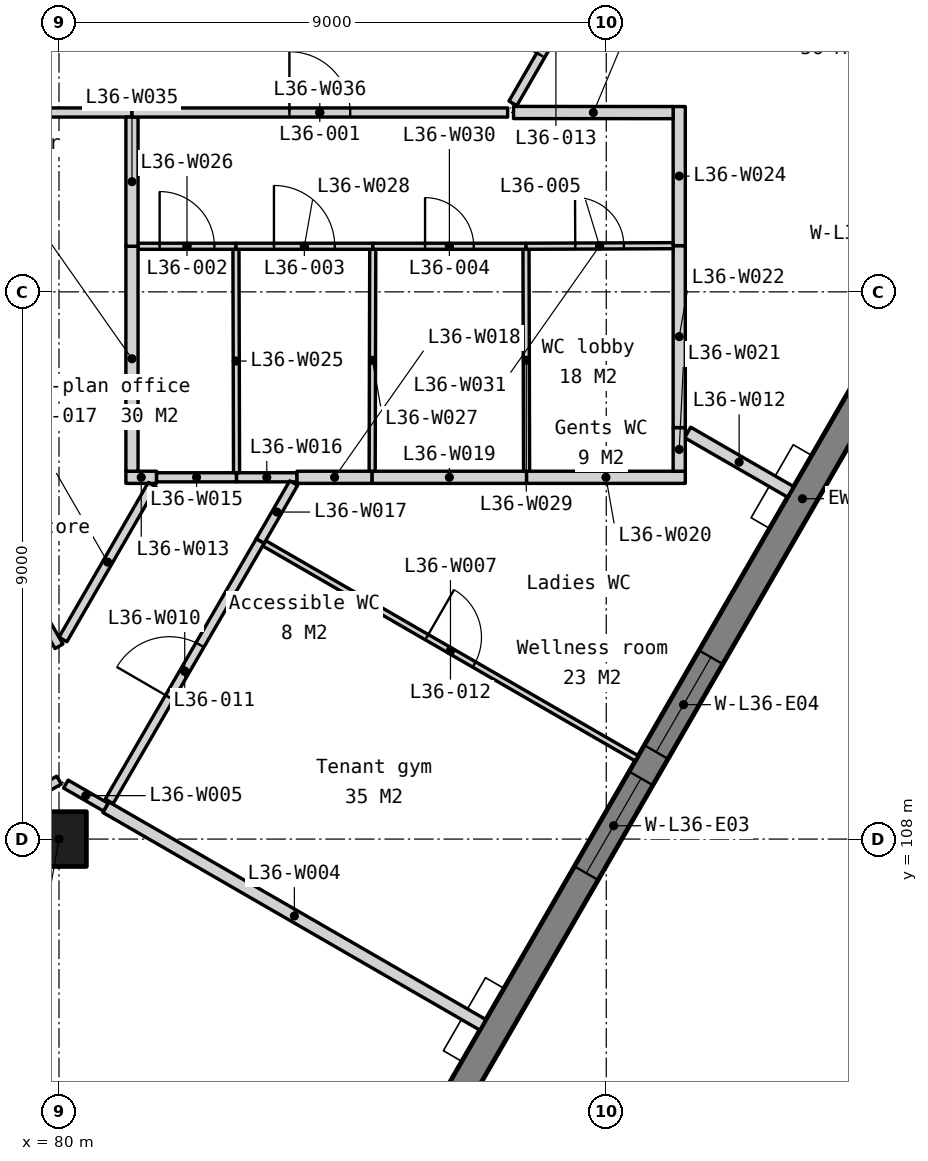
"""IFC4 building model, lengths in metres.
Left out: names, types, materials, properties, quantities, classifications, styles, units other than length and angle.
Written with IfcOpenShell. Run it as: python <this file> out.ifc"""

import sys

from ifc_helpers import new_model, si_unit, direction, frame, frame_2d, origin, origin_2d, place, context, subcontext, project, spatial, polyline, rectangle, outline, extrude, element, fill, save


model = new_model("IFC4")
c1 = context("Model", 3, precision=1e-05, world=origin(), true_north=direction((0.0, 1.0)))
c2 = subcontext(c1, "Body", "Model", "MODEL_VIEW")
j1 = project(units=[si_unit("LENGTHUNIT", "METRE"), si_unit("PLANEANGLEUNIT", "RADIAN")], contexts=[c1])
p1 = place(None, origin())
s1 = spatial("IfcSite", under=j1, at=p1, CompositionType="ELEMENT")
p2 = place(p1, origin())
s2 = spatial("IfcBuilding", under=s1, at=p2, CompositionType="ELEMENT")
p3 = place(p2, frame((0.0, 0.0, 144.2)))
s3 = spatial("IfcBuildingStorey", under=s2, at=p3, CompositionType="ELEMENT", Elevation=144.2)
p4 = place(p3, frame((80.0, 108.0, 0.0), z_axis=(0.0, 0.0, 1.0), x_axis=(1.0, 0.0, 0.0)))
e1 = element("IfcColumn", 1, at=p4, inside=s3, PredefinedType="COLUMN", context=c2, shape_type="SweptSolid", body=[
    extrude(rectangle(XDim=0.9, YDim=0.9, at=origin_2d()), origin(), (0.0, 0.0, 1.0), 3.9),
])
p5 = place(p3, frame((82.105, 96.067, -0.15), z_axis=(0.0, 0.0, 1.0), x_axis=(0.499997369791, 0.866026922331, 0.0)))
e2 = element("IfcWall", 2, at=p5, inside=s3, PredefinedType="SOLIDWALL", context=c2, shape_type="SweptSolid", body=[
    extrude(outline(polyline([(40.486, 0.0), (40.486, 3.9), (0.0, 3.9), (0.0, 0.0), (40.486, 0.0)])), frame((0.0, 0.225, 0.0), z_axis=(0.0, -1.0, 0.0), x_axis=(1.0, 0.0, 0.0)), (0.0, 0.0, 1.0), 0.45),
])
p6 = place(p5, frame((3.011, 0.0, 0.95)))
e3 = element("IfcOpeningElement", 3, at=p6, cuts=e2, PredefinedType="OPENING", context=c2, shape_type="SweptSolid", body=[
    extrude(rectangle(XDim=1.8, YDim=2.2, at=frame_2d((0.9, 1.1))), frame((0.0, 0.235, 0.0), z_axis=(0.0, -1.0, 0.0), x_axis=(1.0, 0.0, 0.0)), (0.0, 0.0, 1.0), 0.47),
])
p7 = place(p5, frame((5.311, 0.0, 0.95)))
e4 = element("IfcOpeningElement", 4, at=p7, cuts=e2, PredefinedType="OPENING", context=c2, shape_type="SweptSolid", body=[
    extrude(rectangle(XDim=1.8, YDim=2.2, at=frame_2d((0.9, 1.1))), frame((0.0, 0.235, 0.0), z_axis=(0.0, -1.0, 0.0), x_axis=(1.0, 0.0, 0.0)), (0.0, 0.0, 1.0), 0.47),
])
p8 = place(p5, frame((13.132, 0.0, 0.95)))
e5 = element("IfcOpeningElement", 5, at=p8, cuts=e2, PredefinedType="OPENING", context=c2, shape_type="SweptSolid", body=[
    extrude(rectangle(XDim=1.8, YDim=2.2, at=frame_2d((0.9, 1.1))), frame((0.0, 0.235, 0.0), z_axis=(0.0, -1.0, 0.0), x_axis=(1.0, 0.0, 0.0)), (0.0, 0.0, 1.0), 0.47),
])
p9 = place(p5, frame((15.432, 0.0, 0.95)))
e6 = element("IfcOpeningElement", 6, at=p9, cuts=e2, PredefinedType="OPENING", context=c2, shape_type="SweptSolid", body=[
    extrude(rectangle(XDim=1.8, YDim=2.2, at=frame_2d((0.9, 1.1))), frame((0.0, 0.235, 0.0), z_axis=(0.0, -1.0, 0.0), x_axis=(1.0, 0.0, 0.0)), (0.0, 0.0, 1.0), 0.47),
])
p10 = place(p5, frame((23.254, 0.0, 0.95)))
e7 = element("IfcOpeningElement", 7, at=p10, cuts=e2, PredefinedType="OPENING", context=c2, shape_type="SweptSolid", body=[
    extrude(rectangle(XDim=1.8, YDim=2.2, at=frame_2d((0.9, 1.1))), frame((0.0, 0.235, 0.0), z_axis=(0.0, -1.0, 0.0), x_axis=(1.0, 0.0, 0.0)), (0.0, 0.0, 1.0), 0.47),
])
p11 = place(p5, frame((25.554, 0.0, 0.95)))
e8 = element("IfcOpeningElement", 8, at=p11, cuts=e2, PredefinedType="OPENING", context=c2, shape_type="SweptSolid", body=[
    extrude(rectangle(XDim=1.8, YDim=2.2, at=frame_2d((0.9, 1.1))), frame((0.0, 0.235, 0.0), z_axis=(0.0, -1.0, 0.0), x_axis=(1.0, 0.0, 0.0)), (0.0, 0.0, 1.0), 0.47),
])
p12 = place(p5, frame((33.375, 0.0, 0.95)))
e9 = element("IfcOpeningElement", 9, at=p12, cuts=e2, PredefinedType="OPENING", context=c2, shape_type="SweptSolid", body=[
    extrude(rectangle(XDim=1.8, YDim=2.2, at=frame_2d((0.9, 1.1))), frame((0.0, 0.235, 0.0), z_axis=(0.0, -1.0, 0.0), x_axis=(1.0, 0.0, 0.0)), (0.0, 0.0, 1.0), 0.47),
])
p13 = place(p5, frame((35.675, 0.0, 0.95)))
e10 = element("IfcOpeningElement", 10, at=p13, cuts=e2, PredefinedType="OPENING", context=c2, shape_type="SweptSolid", body=[
    extrude(rectangle(XDim=1.8, YDim=2.2, at=frame_2d((0.9, 1.1))), frame((0.0, 0.235, 0.0), z_axis=(0.0, -1.0, 0.0), x_axis=(1.0, 0.0, 0.0)), (0.0, 0.0, 1.0), 0.47),
])
p14 = place(p3, frame((79.23, 108.525, 0.0), z_axis=(0.0, 0.0, 1.0), x_axis=(0.865970738743, 0.500094670678, 0.0)))
e11 = element("IfcWall", 11, at=p14, inside=s3, PredefinedType="PARTITIONING", context=c2, shape_type="SweptSolid", body=[
    extrude(rectangle(XDim=0.889, YDim=0.15, at=frame_2d((0.445, 0.0))), origin(), (0.0, 0.0, 1.0), 3.75),
])
p15 = place(p3, frame((80.77, 108.525, 0.0), z_axis=(0.0, 0.0, 1.0), x_axis=(0.866033408367, -0.4999861354, 0.0)))
e12 = element("IfcWall", 12, at=p15, inside=s3, PredefinedType="PARTITIONING", context=c2, shape_type="SweptSolid", body=[
    extrude(rectangle(XDim=7.16, YDim=0.2, at=frame_2d((3.58, 0.0))), origin(), (0.0, 0.0, 1.0), 3.75),
])
p16 = place(p3, frame((80.113, 108.905, 0.0), z_axis=(0.0, 0.0, 1.0), x_axis=(0.865939322839, -0.50014906694, 0.0)))
e13 = element("IfcWall", 13, at=p16, inside=s3, PredefinedType="PARTITIONING", context=c2, shape_type="SweptSolid", body=[
    extrude(rectangle(XDim=0.76, YDim=0.15, at=frame_2d((0.38, 0.0))), origin(), (0.0, 0.0, 1.0), 3.75),
])
p17 = place(p3, frame((83.374, 112.865, 0.0), z_axis=(0.0, 0.0, 1.0), x_axis=(0.866021813296, -0.500006218857, 0.0)))
e14 = element("IfcWall", 14, at=p17, inside=s3, PredefinedType="PARTITIONING", context=c2, shape_type="SweptSolid", body=[
    extrude(rectangle(XDim=7.075, YDim=0.1, at=frame_2d((3.538, 0.0))), origin(), (0.0, 0.0, 1.0), 3.75),
])
p18 = place(p17, frame((3.087, 0.0, 0.0)))
e15 = element("IfcOpeningElement", 15, at=p18, cuts=e14, PredefinedType="OPENING", context=c2, shape_type="SweptSolid", body=[
    extrude(rectangle(XDim=0.9, YDim=2.1, at=frame_2d((0.45, 1.05))), frame((0.0, 0.06, 0.0), z_axis=(0.0, -1.0, 0.0), x_axis=(1.0, 0.0, 0.0)), (0.0, 0.0, 1.0), 0.12),
])
p19 = place(p3, frame((74.931, 119.95, 0.0), z_axis=(0.0, 0.0, 1.0), x_axis=(0.499998319705, -0.866026373901, 0.0)))
e16 = element("IfcWall", 16, at=p19, inside=s3, PredefinedType="PARTITIONING", context=c2, shape_type="SweptSolid", body=[
    extrude(rectangle(XDim=10.138, YDim=0.15, at=frame_2d((5.069, 0.0))), origin(), (0.0, 0.0, 1.0), 3.75),
])
p20 = place(p19, frame((4.169, 0.0, 0.0)))
e17 = element("IfcOpeningElement", 17, at=p20, cuts=e16, PredefinedType="OPENING", context=c2, shape_type="SweptSolid", body=[
    extrude(rectangle(XDim=1.8, YDim=2.1, at=frame_2d((0.9, 1.05))), frame((0.0, 0.085, 0.0), z_axis=(0.0, -1.0, 0.0), x_axis=(1.0, 0.0, 0.0)), (0.0, 0.0, 1.0), 0.17),
])
p21 = place(p3, frame((80.825, 108.62, 0.0), z_axis=(0.0, 0.0, 1.0), x_axis=(0.501704805906, 0.865038893768, 0.0)))
e18 = element("IfcWall", 18, at=p21, inside=s3, PredefinedType="PARTITIONING", context=c2, shape_type="SweptSolid", body=[
    extrude(rectangle(XDim=4.951, YDim=0.15, at=frame_2d((2.476, 0.0))), origin(), (0.0, 0.0, 1.0), 3.75),
])
p22 = place(p21, frame((1.975, 0.0, 0.0)))
e19 = element("IfcOpeningElement", 19, at=p22, cuts=e18, PredefinedType="OPENING", context=c2, shape_type="SweptSolid", body=[
    extrude(rectangle(XDim=1.0, YDim=2.1, at=frame_2d((0.5, 1.05))), frame((0.0, 0.085, 0.0), z_axis=(0.0, -1.0, 0.0), x_axis=(1.0, 0.0, 0.0)), (0.0, 0.0, 1.0), 0.17),
])
p23 = place(p3, frame((90.339, 114.688, 0.0), z_axis=(0.0, 0.0, 1.0), x_axis=(0.866021300503, -0.500007107024, 0.0)))
e20 = element("IfcWall", 20, at=p23, inside=s3, PredefinedType="PARTITIONING", context=c2, shape_type="SweptSolid", body=[
    extrude(rectangle(XDim=1.955, YDim=0.2, at=frame_2d((0.978, 0.0))), origin(), (0.0, 0.0, 1.0), 3.75),
])
p24 = place(p3, frame((81.1, 113.95, 0.0), z_axis=(0.0, 0.0, 1.0), x_axis=(1.0, 0.0, 0.0)))
e21 = element("IfcWall", 21, at=p24, inside=s3, PredefinedType="PARTITIONING", context=c2, shape_type="SweptSolid", body=[
    extrude(rectangle(XDim=0.505, YDim=0.2, at=frame_2d((0.252, 0.0))), origin(), (0.0, 0.0, 1.0), 3.75),
])
p25 = place(p3, frame((80.065, 111.283, 0.0), z_axis=(0.0, 0.0, 1.0), x_axis=(0.499962090823, 0.866047289552, 0.0)))
e22 = element("IfcWall", 22, at=p25, inside=s3, PredefinedType="PARTITIONING", context=c2, shape_type="SweptSolid", body=[
    extrude(rectangle(XDim=2.94, YDim=0.15, at=frame_2d((1.47, 0.0))), origin(), (0.0, 0.0, 1.0), 3.75),
])
p26 = place(p3, frame((81.605, 113.95, 0.0), z_axis=(0.0, 0.0, 1.0), x_axis=(1.0, 0.0, 0.0)))
e23 = element("IfcWall", 23, at=p26, inside=s3, PredefinedType="PARTITIONING", context=c2, shape_type="SweptSolid", body=[
    extrude(rectangle(XDim=1.315, YDim=0.15, at=frame_2d((0.658, 0.0))), origin(), (0.0, 0.0, 1.0), 3.75),
])
p27 = place(p3, frame((82.92, 113.95, 0.0), z_axis=(0.0, 0.0, 1.0), x_axis=(1.0, 0.0, 0.0)))
e24 = element("IfcWall", 24, at=p27, inside=s3, PredefinedType="PARTITIONING", context=c2, shape_type="SweptSolid", body=[
    extrude(rectangle(XDim=0.994, YDim=0.15, at=frame_2d((0.497, 0.0))), origin(), (0.0, 0.0, 1.0), 3.75),
])
p28 = place(p3, frame((83.309, 112.903, 0.0), z_axis=(0.0, 0.0, 1.0), x_axis=(0.500055614084, 0.865993292597, 0.0)))
e25 = element("IfcWall", 25, at=p28, inside=s3, PredefinedType="PARTITIONING", context=c2, shape_type="SweptSolid", body=[
    extrude(rectangle(XDim=1.099, YDim=0.15, at=frame_2d((0.55, 0.0))), origin(), (0.0, 0.0, 1.0), 3.75),
])
p29 = place(p3, frame((83.914, 113.95, 0.0), z_axis=(0.0, 0.0, 1.0), x_axis=(1.0, 0.0, 0.0)))
e26 = element("IfcWall", 26, at=p29, inside=s3, PredefinedType="PARTITIONING", context=c2, shape_type="SweptSolid", body=[
    extrude(rectangle(XDim=1.236, YDim=0.2, at=frame_2d((0.618, 0.0))), origin(), (0.0, 0.0, 1.0), 3.75),
])
p30 = place(p3, frame((85.15, 113.95, 0.0), z_axis=(0.0, 0.0, 1.0), x_axis=(1.0, 0.0, 0.0)))
e27 = element("IfcWall", 27, at=p30, inside=s3, PredefinedType="PARTITIONING", context=c2, shape_type="SweptSolid", body=[
    extrude(rectangle(XDim=2.54, YDim=0.2, at=frame_2d((1.27, 0.0))), origin(), (0.0, 0.0, 1.0), 3.75),
])
p31 = place(p3, frame((87.69, 113.95, 0.0), z_axis=(0.0, 0.0, 1.0), x_axis=(1.0, 0.0, 0.0)))
e28 = element("IfcWall", 28, at=p31, inside=s3, PredefinedType="PARTITIONING", context=c2, shape_type="SweptSolid", body=[
    extrude(rectangle(XDim=2.61, YDim=0.2, at=frame_2d((1.305, 0.0))), origin(), (0.0, 0.0, 1.0), 3.75),
])
p32 = place(p3, frame((90.2, 114.05, 0.0), z_axis=(0.0, 0.0, 1.0), x_axis=(0.0, 1.0, 0.0)))
e29 = element("IfcWall", 29, at=p32, inside=s3, PredefinedType="PARTITIONING", context=c2, shape_type="SweptSolid", body=[
    extrude(rectangle(XDim=0.718, YDim=0.2, at=frame_2d((0.359, 0.0))), origin(), (0.0, 0.0, 1.0), 3.75),
])
p33 = place(p3, frame((90.2, 114.768, 0.0), z_axis=(0.0, 0.0, 1.0), x_axis=(0.0, 1.0, 0.0)))
e30 = element("IfcWall", 30, at=p33, inside=s3, PredefinedType="PARTITIONING", context=c2, shape_type="SweptSolid", body=[
    extrude(rectangle(XDim=2.992, YDim=0.2, at=frame_2d((1.496, 0.0))), origin(), (0.0, 0.0, 1.0), 3.75),
])
p34 = place(p3, frame((90.2, 117.76, 0.0), z_axis=(0.0, 0.0, 1.0), x_axis=(0.0, 1.0, 0.0)))
e31 = element("IfcWall", 31, at=p34, inside=s3, PredefinedType="PARTITIONING", context=c2, shape_type="SweptSolid", body=[
    extrude(rectangle(XDim=2.288, YDim=0.2, at=frame_2d((1.144, 0.0))), origin(), (0.0, 0.0, 1.0), 3.75),
])
p35 = place(p3, frame((82.92, 114.025, 0.0), z_axis=(0.0, 0.0, 1.0), x_axis=(-0.002657268237, 0.999996469457, 0.0)))
e32 = element("IfcWall", 32, at=p35, inside=s3, PredefinedType="PARTITIONING", context=c2, shape_type="SweptSolid", body=[
    extrude(rectangle(XDim=3.675, YDim=0.1, at=frame_2d((1.837, 0.0))), origin(), (0.0, 0.0, 1.0), 3.75),
])
p36 = place(p3, frame((81.3, 117.75, 0.0), z_axis=(0.0, 0.0, 1.0), x_axis=(1.0, 0.0, 0.0)))
e33 = element("IfcWall", 33, at=p36, inside=s3, PredefinedType="PARTITIONING", context=c2, shape_type="SweptSolid", body=[
    extrude(rectangle(XDim=1.61, YDim=0.1, at=frame_2d((0.805, 0.0))), origin(), (0.0, 0.0, 1.0), 3.75),
])
p37 = place(p36, frame((0.355, 0.0, 0.0)))
e34 = element("IfcOpeningElement", 34, at=p37, cuts=e33, PredefinedType="OPENING", context=c2, shape_type="SweptSolid", body=[
    extrude(rectangle(XDim=0.9, YDim=2.1, at=frame_2d((0.45, 1.05))), frame((0.0, 0.06, 0.0), z_axis=(0.0, -1.0, 0.0), x_axis=(1.0, 0.0, 0.0)), (0.0, 0.0, 1.0), 0.12),
])
p38 = place(p3, frame((85.15, 114.05, 0.0), z_axis=(0.0, 0.0, 1.0), x_axis=(0.002675575707, 0.999996420641, 0.0)))
e35 = element("IfcWall", 35, at=p38, inside=s3, PredefinedType="PARTITIONING", context=c2, shape_type="SweptSolid", body=[
    extrude(rectangle(XDim=3.65, YDim=0.1, at=frame_2d((1.825, 0.0))), origin(), (0.0, 0.0, 1.0), 3.75),
])
p39 = place(p3, frame((82.91, 117.75, 0.0), z_axis=(0.0, 0.0, 1.0), x_axis=(1.0, 0.0, 0.0)))
e36 = element("IfcWall", 36, at=p39, inside=s3, PredefinedType="PARTITIONING", context=c2, shape_type="SweptSolid", body=[
    extrude(rectangle(XDim=2.25, YDim=0.1, at=frame_2d((1.125, 0.0))), origin(), (0.0, 0.0, 1.0), 3.75),
])
p40 = place(p39, frame((0.625, 0.0, 0.0)))
e37 = element("IfcOpeningElement", 37, at=p40, cuts=e36, PredefinedType="OPENING", context=c2, shape_type="SweptSolid", body=[
    extrude(rectangle(XDim=1.0, YDim=2.1, at=frame_2d((0.5, 1.05))), frame((0.0, 0.06, 0.0), z_axis=(0.0, -1.0, 0.0), x_axis=(1.0, 0.0, 0.0)), (0.0, 0.0, 1.0), 0.12),
])
p41 = place(p3, frame((87.69, 114.05, 0.0), z_axis=(0.0, 0.0, 1.0), x_axis=(-0.002608686776, 0.999996597371, 0.0)))
e38 = element("IfcWall", 38, at=p41, inside=s3, PredefinedType="PARTITIONING", context=c2, shape_type="SweptSolid", body=[
    extrude(rectangle(XDim=3.65, YDim=0.1, at=frame_2d((1.825, 0.0))), origin(), (0.0, 0.0, 1.0), 3.75),
])
p42 = place(p3, frame((85.16, 117.75, 0.0), z_axis=(0.0, 0.0, 1.0), x_axis=(1.0, 0.0, 0.0)))
e39 = element("IfcWall", 39, at=p42, inside=s3, PredefinedType="PARTITIONING", context=c2, shape_type="SweptSolid", body=[
    extrude(rectangle(XDim=2.52, YDim=0.1, at=frame_2d((1.26, 0.0))), origin(), (0.0, 0.0, 1.0), 3.75),
])
p43 = place(p42, frame((0.86, 0.0, 0.0)))
e40 = element("IfcOpeningElement", 40, at=p43, cuts=e39, PredefinedType="OPENING", context=c2, shape_type="SweptSolid", body=[
    extrude(rectangle(XDim=0.8, YDim=2.1, at=frame_2d((0.4, 1.05))), frame((0.0, 0.06, 0.0), z_axis=(0.0, -1.0, 0.0), x_axis=(1.0, 0.0, 0.0)), (0.0, 0.0, 1.0), 0.12),
])
p44 = place(p3, frame((87.68, 117.75, 0.0), z_axis=(0.0, 0.0, 1.0), x_axis=(0.999992261016, 0.003934197335, 0.0)))
e41 = element("IfcWall", 41, at=p44, inside=s3, PredefinedType="PARTITIONING", context=c2, shape_type="SweptSolid", body=[
    extrude(rectangle(XDim=2.42, YDim=0.1, at=frame_2d((1.21, 0.0))), origin(), (0.0, 0.0, 1.0), 3.75),
])
p45 = place(p44, frame((0.81, 0.0, 0.0)))
e42 = element("IfcOpeningElement", 42, at=p45, cuts=e41, PredefinedType="OPENING", context=c2, shape_type="SweptSolid", body=[
    extrude(rectangle(XDim=0.8, YDim=2.1, at=frame_2d((0.4, 1.05))), frame((0.0, 0.06, 0.0), z_axis=(0.0, -1.0, 0.0), x_axis=(1.0, 0.0, 0.0)), (0.0, 0.0, 1.0), 0.12),
])
p46 = place(p3, frame((81.2, 114.05, 0.0), z_axis=(0.0, 0.0, 1.0), x_axis=(0.0, 1.0, 0.0)))
e43 = element("IfcWall", 43, at=p46, inside=s3, PredefinedType="PARTITIONING", context=c2, shape_type="SweptSolid", body=[
    extrude(rectangle(XDim=3.7, YDim=0.2, at=frame_2d((1.85, 0.0))), origin(), (0.0, 0.0, 1.0), 3.75),
])
p47 = place(p3, frame((75.061, 119.95, 0.0), z_axis=(0.0, 0.0, 1.0), x_axis=(1.0, 0.0, 0.0)))
e44 = element("IfcWall", 44, at=p47, inside=s3, PredefinedType="PARTITIONING", context=c2, shape_type="SweptSolid", body=[
    extrude(rectangle(XDim=6.139, YDim=0.15, at=frame_2d((3.069, 0.0))), origin(), (0.0, 0.0, 1.0), 3.75),
])
p48 = place(p3, frame((81.2, 117.75, 0.0), z_axis=(0.0, 0.0, 1.0), x_axis=(0.0, 1.0, 0.0)))
e45 = element("IfcWall", 45, at=p48, inside=s3, PredefinedType="PARTITIONING", context=c2, shape_type="SweptSolid", body=[
    extrude(rectangle(XDim=2.125, YDim=0.2, at=frame_2d((1.062, 0.0))), origin(), (0.0, 0.0, 1.0), 3.75),
])
p49 = place(p3, frame((81.2, 119.95, 0.0), z_axis=(0.0, 0.0, 1.0), x_axis=(1.0, 0.0, 0.0)))
e46 = element("IfcWall", 46, at=p49, inside=s3, PredefinedType="PARTITIONING", context=c2, shape_type="SweptSolid", body=[
    extrude(rectangle(XDim=6.178, YDim=0.15, at=frame_2d((3.089, 0.0))), origin(), (0.0, 0.0, 1.0), 3.75),
])
p50 = place(p49, frame((2.589, 0.0, 0.0)))
e47 = element("IfcOpeningElement", 47, at=p50, cuts=e46, PredefinedType="OPENING", context=c2, shape_type="SweptSolid", body=[
    extrude(rectangle(XDim=1.0, YDim=2.1, at=frame_2d((0.5, 1.05))), frame((0.0, 0.085, 0.0), z_axis=(0.0, -1.0, 0.0), x_axis=(1.0, 0.0, 0.0)), (0.0, 0.0, 1.0), 0.17),
])
p51 = place(p3, frame((87.475, 119.95, 0.0), z_axis=(0.0, 0.0, 1.0), x_axis=(0.999999723197, -0.000744047413, 0.0)))
e48 = element("IfcWall", 48, at=p51, inside=s3, PredefinedType="PARTITIONING", context=c2, shape_type="SweptSolid", body=[
    extrude(rectangle(XDim=2.625, YDim=0.2, at=frame_2d((1.312, 0.0))), origin(), (0.0, 0.0, 1.0), 3.75),
])
p52 = place(p3, frame((87.465, 120.1, 0.0), z_axis=(0.0, 0.0, 1.0), x_axis=(0.499991416419, 0.86603035946, 0.0)))
e49 = element("IfcWall", 49, at=p52, inside=s3, PredefinedType="PARTITIONING", context=c2, shape_type="SweptSolid", body=[
    extrude(rectangle(XDim=2.829, YDim=0.15, at=frame_2d((1.414, 0.0))), origin(), (0.0, 0.0, 1.0), 3.75),
])
p53 = place(p52, frame((0.914, 0.0, 0.0)))
e50 = element("IfcOpeningElement", 50, at=p53, cuts=e49, PredefinedType="OPENING", context=c2, shape_type="SweptSolid", body=[
    extrude(rectangle(XDim=1.0, YDim=2.1, at=frame_2d((0.5, 1.05))), frame((0.0, 0.085, 0.0), z_axis=(0.0, -1.0, 0.0), x_axis=(1.0, 0.0, 0.0)), (0.0, 0.0, 1.0), 0.17),
])
p54 = place(p8, origin())
e51 = element("IfcWindow", 51, at=p54, inside=s3, PartitioningType="SINGLE_PANEL", PredefinedType="WINDOW", context=c2, shape_type="SweptSolid", body=[
    extrude(rectangle(XDim=1.8, YDim=2.2, at=frame_2d((0.9, 1.1))), frame((0.0, 0.03, 0.0), z_axis=(0.0, -1.0, 0.0), x_axis=(1.0, 0.0, 0.0)), (0.0, 0.0, 1.0), 0.06),
])
fill(e5, e51)
p55 = place(p9, origin())
e52 = element("IfcWindow", 52, at=p55, inside=s3, PartitioningType="SINGLE_PANEL", PredefinedType="WINDOW", context=c2, shape_type="SweptSolid", body=[
    extrude(rectangle(XDim=1.8, YDim=2.2, at=frame_2d((0.9, 1.1))), frame((0.0, 0.03, 0.0), z_axis=(0.0, -1.0, 0.0), x_axis=(1.0, 0.0, 0.0)), (0.0, 0.0, 1.0), 0.06),
])
fill(e6, e52)
p56 = place(p50, origin())
e53 = element("IfcDoor", 53, at=p56, inside=s3, OperationType="SINGLE_SWING_LEFT", PredefinedType="DOOR", context=c2, shape_type="SweptSolid", body=[
    extrude(rectangle(XDim=1.0, YDim=2.1, at=frame_2d((0.5, 1.05))), frame((0.0, 0.025, 0.0), z_axis=(0.0, -1.0, 0.0), x_axis=(1.0, 0.0, 0.0)), (0.0, 0.0, 1.0), 0.05),
])
fill(e47, e53)
p57 = place(p37, origin())
e54 = element("IfcDoor", 54, at=p57, inside=s3, OperationType="SINGLE_SWING_LEFT", PredefinedType="DOOR", context=c2, shape_type="SweptSolid", body=[
    extrude(rectangle(XDim=0.9, YDim=2.1, at=frame_2d((0.45, 1.05))), frame((0.0, 0.025, 0.0), z_axis=(0.0, -1.0, 0.0), x_axis=(1.0, 0.0, 0.0)), (0.0, 0.0, 1.0), 0.05),
])
fill(e34, e54)
p58 = place(p40, origin())
e55 = element("IfcDoor", 55, at=p58, inside=s3, OperationType="SINGLE_SWING_LEFT", PredefinedType="DOOR", context=c2, shape_type="SweptSolid", body=[
    extrude(rectangle(XDim=1.0, YDim=2.1, at=frame_2d((0.5, 1.05))), frame((0.0, 0.025, 0.0), z_axis=(0.0, -1.0, 0.0), x_axis=(1.0, 0.0, 0.0)), (0.0, 0.0, 1.0), 0.05),
])
fill(e37, e55)
p59 = place(p43, origin())
e56 = element("IfcDoor", 56, at=p59, inside=s3, OperationType="SINGLE_SWING_LEFT", PredefinedType="DOOR", context=c2, shape_type="SweptSolid", body=[
    extrude(rectangle(XDim=0.8, YDim=2.1, at=frame_2d((0.4, 1.05))), frame((0.0, 0.025, 0.0), z_axis=(0.0, -1.0, 0.0), x_axis=(1.0, 0.0, 0.0)), (0.0, 0.0, 1.0), 0.05),
])
fill(e40, e56)
p60 = place(p45, origin())
e57 = element("IfcDoor", 57, at=p60, inside=s3, OperationType="SINGLE_SWING_LEFT", PredefinedType="DOOR", context=c2, shape_type="SweptSolid", body=[
    extrude(rectangle(XDim=0.8, YDim=2.1, at=frame_2d((0.4, 1.05))), frame((0.0, 0.025, 0.0), z_axis=(0.0, -1.0, 0.0), x_axis=(1.0, 0.0, 0.0)), (0.0, 0.0, 1.0), 0.05),
])
fill(e42, e57)
p61 = place(p22, origin())
e58 = element("IfcDoor", 58, at=p61, inside=s3, OperationType="SINGLE_SWING_LEFT", PredefinedType="DOOR", context=c2, shape_type="SweptSolid", body=[
    extrude(rectangle(XDim=1.0, YDim=2.1, at=frame_2d((0.5, 1.05))), frame((0.0, 0.025, 0.0), z_axis=(0.0, -1.0, 0.0), x_axis=(1.0, 0.0, 0.0)), (0.0, 0.0, 1.0), 0.05),
])
fill(e19, e58)
p62 = place(p18, origin())
e59 = element("IfcDoor", 59, at=p62, inside=s3, OperationType="SINGLE_SWING_LEFT", PredefinedType="DOOR", context=c2, shape_type="SweptSolid", body=[
    extrude(rectangle(XDim=0.9, YDim=2.1, at=frame_2d((0.45, 1.05))), frame((0.0, 0.025, 0.0), z_axis=(0.0, -1.0, 0.0), x_axis=(1.0, 0.0, 0.0)), (0.0, 0.0, 1.0), 0.05),
])
fill(e15, e59)
p63 = place(p53, origin())
e60 = element("IfcDoor", 60, at=p63, inside=s3, OperationType="SINGLE_SWING_LEFT", PredefinedType="DOOR", context=c2, shape_type="SweptSolid", body=[
    extrude(rectangle(XDim=1.0, YDim=2.1, at=frame_2d((0.5, 1.05))), frame((0.0, 0.025, 0.0), z_axis=(0.0, -1.0, 0.0), x_axis=(1.0, 0.0, 0.0)), (0.0, 0.0, 1.0), 0.05),
])
fill(e50, e60)
save(model, sys.argv[1])
